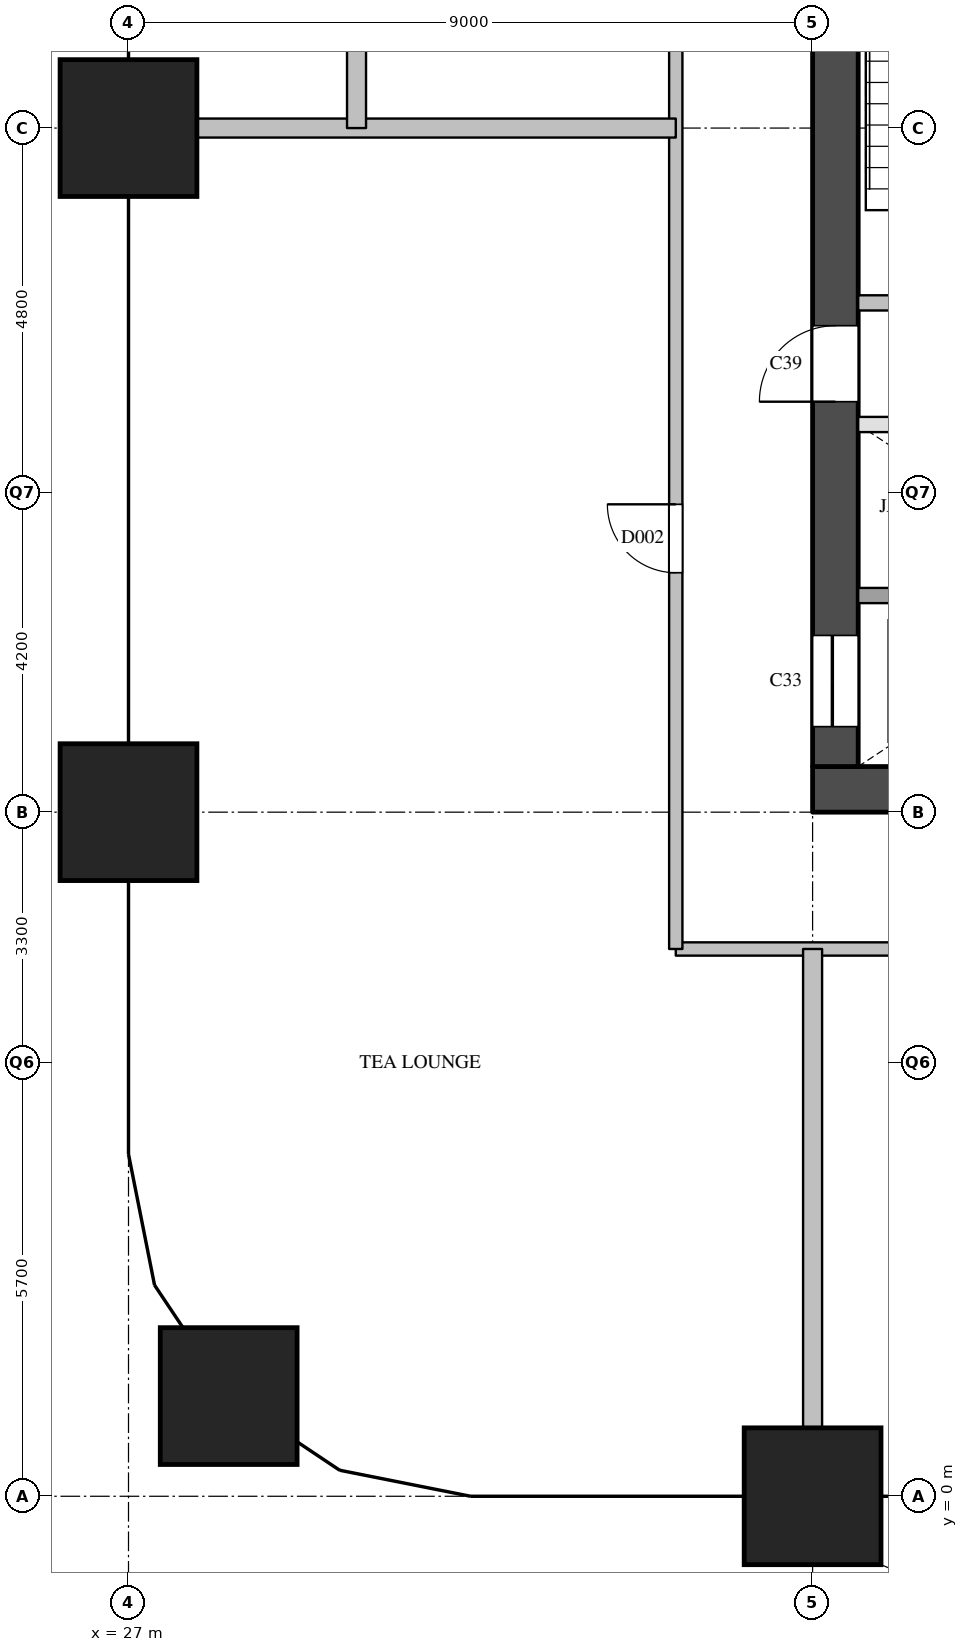
"""IFC4 building model, lengths in metres.
Left out: names, types, materials, properties, quantities, classifications, styles, units other than length and angle.
Written with IfcOpenShell. Run it as: python <this file> out.ifc"""

import sys

from ifc_helpers import new_model, si_unit, direction, frame, frame_2d, origin, origin_2d, place, context, subcontext, project, spatial, rectangle, extrude, element, fill, save


model = new_model("IFC4")
c1 = context("Model", 3, precision=1e-05, world=origin(), true_north=direction((0.0, 1.0)))
c2 = subcontext(c1, "Body", "Model", "MODEL_VIEW")
j1 = project(units=[si_unit("LENGTHUNIT", "METRE"), si_unit("PLANEANGLEUNIT", "RADIAN")], contexts=[c1])
p1 = place(None, origin())
s1 = spatial("IfcSite", under=j1, at=p1, CompositionType="ELEMENT")
p2 = place(p1, origin())
s2 = spatial("IfcBuilding", under=s1, at=p2, CompositionType="ELEMENT")
p3 = place(p2, frame((0.0, 0.0, 115.8)))
s3 = spatial("IfcBuildingStorey", under=s2, at=p3, CompositionType="ELEMENT", Elevation=115.8)
for number, where, z_axis, x_axis in (
    (1, (28.318, 1.318, 0.0), (0.0, 0.0, 1.0), (1.0, 0.0, 0.0)),
    (2, (27.0, 9.0, 0.0), (0.0, 0.0, 1.0), (1.0, 0.0, 0.0)),
    (3, (27.0, 18.0, 0.0), (0.0, 0.0, 1.0), (1.0, 0.0, 0.0)),
    (4, (36.0, 0.0, 0.0), (0.0, 0.0, 1.0), (1.0, 0.0, 0.0)),
):
    element("IfcColumn", number, at=place(p3, frame(where, z_axis=z_axis, x_axis=x_axis)), inside=s3, PredefinedType="COLUMN", context=c2, shape_type="SweptSolid", body=[
        extrude(rectangle(XDim=1.8, YDim=1.8, at=origin_2d()), origin(), (0.0, 0.0, 1.0), 3.8),
    ])
p4 = place(p3, frame((36.0, 9.3, 0.0), z_axis=(0.0, 0.0, 1.0), x_axis=(1.0, 0.0, 0.0)))
e5 = element("IfcWall", 5, at=p4, inside=s3, PredefinedType="SHEAR", context=c2, shape_type="SweptSolid", body=[
    extrude(rectangle(XDim=9.0, YDim=0.6, at=frame_2d((4.5, 0.0))), origin(), (0.0, 0.0, 1.0), 3.5),
])
p5 = place(p3, frame((36.3, 9.6, 0.0), z_axis=(0.0, 0.0, 1.0), x_axis=(0.0, 1.0, 0.0)))
e6 = element("IfcWall", 6, at=p5, inside=s3, PredefinedType="SHEAR", context=c2, shape_type="SweptSolid", body=[
    extrude(rectangle(XDim=12.3, YDim=0.6, at=frame_2d((6.15, 0.0))), origin(), (0.0, 0.0, 1.0), 3.5),
])
p6 = place(p5, frame((0.525, 0.0, 0.0)))
e7 = element("IfcOpeningElement", 7, at=p6, cuts=e6, PredefinedType="OPENING", context=c2, shape_type="SweptSolid", body=[
    extrude(rectangle(XDim=1.2, YDim=2.1, at=frame_2d((0.6, 1.05))), frame((0.0, 0.31, 0.0), z_axis=(0.0, -1.0, 0.0), x_axis=(1.0, 0.0, 0.0)), (0.0, 0.0, 1.0), 0.62),
])
p7 = place(p5, frame((4.8, 0.0, 0.0)))
e8 = element("IfcOpeningElement", 8, at=p7, cuts=e6, PredefinedType="OPENING", context=c2, shape_type="SweptSolid", body=[
    extrude(rectangle(XDim=1.0, YDim=2.1, at=frame_2d((0.5, 1.05))), frame((0.0, 0.31, 0.0), z_axis=(0.0, -1.0, 0.0), x_axis=(1.0, 0.0, 0.0)), (0.0, 0.0, 1.0), 0.62),
])
p8 = place(p3, frame((36.6, 11.85, 0.0), z_axis=(0.0, 0.0, 1.0), x_axis=(1.0, 0.0, 0.0)))
e9 = element("IfcWall", 9, at=p8, inside=s3, PredefinedType="SOLIDWALL", context=c2, shape_type="SweptSolid", body=[
    extrude(rectangle(XDim=7.8, YDim=0.2, at=frame_2d((3.9, 0.0))), origin(), (0.0, 0.0, 1.0), 3.5),
])
p9 = place(p3, frame((36.6, 14.1, 0.0), z_axis=(0.0, 0.0, 1.0), x_axis=(1.0, 0.0, 0.0)))
e10 = element("IfcWall", 10, at=p9, inside=s3, PredefinedType="PARTITIONING", context=c2, shape_type="SweptSolid", body=[
    extrude(rectangle(XDim=6.0, YDim=0.2, at=frame_2d((3.0, 0.0))), origin(), (0.0, 0.0, 1.0), 3.5),
])
p10 = place(p9, frame((1.5, 0.0, 0.0)))
e11 = element("IfcOpeningElement", 11, at=p10, cuts=e10, PredefinedType="OPENING", context=c2, shape_type="SweptSolid", body=[
    extrude(rectangle(XDim=0.9, YDim=2.1, at=frame_2d((0.45, 1.05))), frame((0.0, 0.11, 0.0), z_axis=(0.0, -1.0, 0.0), x_axis=(1.0, 0.0, 0.0)), (0.0, 0.0, 1.0), 0.22),
])
p11 = place(p9, frame((4.5, 0.0, 0.0)))
e12 = element("IfcOpeningElement", 12, at=p11, cuts=e10, PredefinedType="OPENING", context=c2, shape_type="SweptSolid", body=[
    extrude(rectangle(XDim=0.9, YDim=2.1, at=frame_2d((0.45, 1.05))), frame((0.0, 0.11, 0.0), z_axis=(0.0, -1.0, 0.0), x_axis=(1.0, 0.0, 0.0)), (0.0, 0.0, 1.0), 0.22),
])
p12 = place(p3, frame((36.6, 15.7, 0.0), z_axis=(0.0, 0.0, 1.0), x_axis=(1.0, 0.0, 0.0)))
e13 = element("IfcWall", 13, at=p12, inside=s3, PredefinedType="SOLIDWALL", context=c2, shape_type="SweptSolid", body=[
    extrude(rectangle(XDim=6.3, YDim=0.2, at=frame_2d((3.15, 0.0))), origin(), (0.0, 0.0, 1.0), 3.5),
])
p13 = place(p12, frame((1.025, 0.0, 0.0)))
e14 = element("IfcOpeningElement", 14, at=p13, cuts=e13, PredefinedType="OPENING", context=c2, shape_type="SweptSolid", body=[
    extrude(rectangle(XDim=1.1, YDim=2.1, at=frame_2d((0.55, 1.05))), frame((0.0, 0.11, 0.0), z_axis=(0.0, -1.0, 0.0), x_axis=(1.0, 0.0, 0.0)), (0.0, 0.0, 1.0), 0.22),
])
p14 = place(p12, frame((4.175, 0.0, 0.0)))
e15 = element("IfcOpeningElement", 15, at=p14, cuts=e13, PredefinedType="OPENING", context=c2, shape_type="SweptSolid", body=[
    extrude(rectangle(XDim=1.1, YDim=2.1, at=frame_2d((0.55, 1.05))), frame((0.0, 0.11, 0.0), z_axis=(0.0, -1.0, 0.0), x_axis=(1.0, 0.0, 0.0)), (0.0, 0.0, 1.0), 0.22),
])
p15 = place(p3, frame((34.2, 7.2, 0.0), z_axis=(0.0, 0.0, 1.0), x_axis=(1.0, 0.0, 0.0)))
e16 = element("IfcWall", 16, at=p15, inside=s3, PredefinedType="PARTITIONING", context=c2, shape_type="SweptSolid", body=[
    extrude(rectangle(XDim=12.6, YDim=0.175, at=frame_2d((6.3, 0.0))), origin(), (0.0, 0.0, 1.0), 3.5),
])
p16 = place(p15, frame((6.75, 0.0, 0.0)))
e17 = element("IfcOpeningElement", 17, at=p16, cuts=e16, PredefinedType="OPENING", context=c2, shape_type="SweptSolid", body=[
    extrude(rectangle(XDim=0.9, YDim=2.1, at=frame_2d((0.45, 1.05))), frame((0.0, 0.097, 0.0), z_axis=(0.0, -1.0, 0.0), x_axis=(1.0, 0.0, 0.0)), (0.0, 0.0, 1.0), 0.195),
])
p17 = place(p3, frame((34.2, 7.2, 0.0), z_axis=(0.0, 0.0, 1.0), x_axis=(0.0, 1.0, 0.0)))
e18 = element("IfcWall", 18, at=p17, inside=s3, PredefinedType="PARTITIONING", context=c2, shape_type="SweptSolid", body=[
    extrude(rectangle(XDim=16.49, YDim=0.175, at=frame_2d((8.245, 0.0))), origin(), (0.0, 0.0, 1.0), 3.5),
])
p18 = place(p17, frame((4.95, 0.0, 0.0)))
e19 = element("IfcOpeningElement", 19, at=p18, cuts=e18, PredefinedType="OPENING", context=c2, shape_type="SweptSolid", body=[
    extrude(rectangle(XDim=0.9, YDim=2.1, at=frame_2d((0.45, 1.05))), frame((0.0, 0.097, 0.0), z_axis=(0.0, -1.0, 0.0), x_axis=(1.0, 0.0, 0.0)), (0.0, 0.0, 1.0), 0.195),
])
p19 = place(p17, frame((13.195, 0.0, 0.0)))
e20 = element("IfcOpeningElement", 20, at=p19, cuts=e18, PredefinedType="OPENING", context=c2, shape_type="SweptSolid", body=[
    extrude(rectangle(XDim=0.9, YDim=2.1, at=frame_2d((0.45, 1.05))), frame((0.0, 0.097, 0.0), z_axis=(0.0, -1.0, 0.0), x_axis=(1.0, 0.0, 0.0)), (0.0, 0.0, 1.0), 0.195),
])
p20 = place(p3, frame((27.0, 18.0, 0.0), z_axis=(0.0, 0.0, 1.0), x_axis=(1.0, 0.0, 0.0)))
e21 = element("IfcWall", 21, at=p20, inside=s3, PredefinedType="PARTITIONING", context=c2, shape_type="SweptSolid", body=[
    extrude(rectangle(XDim=7.2, YDim=0.25, at=frame_2d((3.6, 0.0))), origin(), (0.0, 0.0, 1.0), 3.5),
])
p21 = place(p3, frame((30.0, 18.0, 0.0), z_axis=(0.0, 0.0, 1.0), x_axis=(0.0, 1.0, 0.0)))
e22 = element("IfcWall", 22, at=p21, inside=s3, PredefinedType="PARTITIONING", context=c2, shape_type="SweptSolid", body=[
    extrude(rectangle(XDim=12.0, YDim=0.25, at=frame_2d((6.0, 0.0))), origin(), (0.0, 0.0, 1.0), 2.5),
])
p22 = place(p3, frame((36.0, 0.0, 0.0), z_axis=(0.0, 0.0, 1.0), x_axis=(0.0, 1.0, 0.0)))
e23 = element("IfcWall", 23, at=p22, inside=s3, PredefinedType="PARTITIONING", context=c2, shape_type="SweptSolid", body=[
    extrude(rectangle(XDim=7.2, YDim=0.25, at=frame_2d((3.6, 0.0))), origin(), (0.0, 0.0, 1.0), 3.5),
])
p23 = place(p6, origin())
e24 = element("IfcDoor", 24, at=p23, inside=s3, OperationType="SLIDING_TO_LEFT", PredefinedType="DOOR", context=c2, shape_type="SweptSolid", body=[
    extrude(rectangle(XDim=1.2, YDim=2.1, at=frame_2d((0.6, 1.05))), frame((0.0, 0.025, 0.0), z_axis=(0.0, -1.0, 0.0), x_axis=(1.0, 0.0, 0.0)), (0.0, 0.0, 1.0), 0.05),
])
fill(e7, e24)
p24 = place(p7, origin())
e25 = element("IfcDoor", 25, at=p24, inside=s3, OperationType="SINGLE_SWING_LEFT", PredefinedType="DOOR", context=c2, shape_type="SweptSolid", body=[
    extrude(rectangle(XDim=1.0, YDim=2.1, at=frame_2d((0.5, 1.05))), frame((0.0, 0.025, 0.0), z_axis=(0.0, -1.0, 0.0), x_axis=(1.0, 0.0, 0.0)), (0.0, 0.0, 1.0), 0.05),
])
fill(e8, e25)
p25 = place(p18, origin())
e26 = element("IfcDoor", 26, at=p25, inside=s3, OperationType="SINGLE_SWING_RIGHT", PredefinedType="DOOR", context=c2, shape_type="SweptSolid", body=[
    extrude(rectangle(XDim=0.9, YDim=2.1, at=frame_2d((0.45, 1.05))), frame((0.0, 0.025, 0.0), z_axis=(0.0, -1.0, 0.0), x_axis=(1.0, 0.0, 0.0)), (0.0, 0.0, 1.0), 0.05),
])
fill(e19, e26)
save(model, sys.argv[1])
